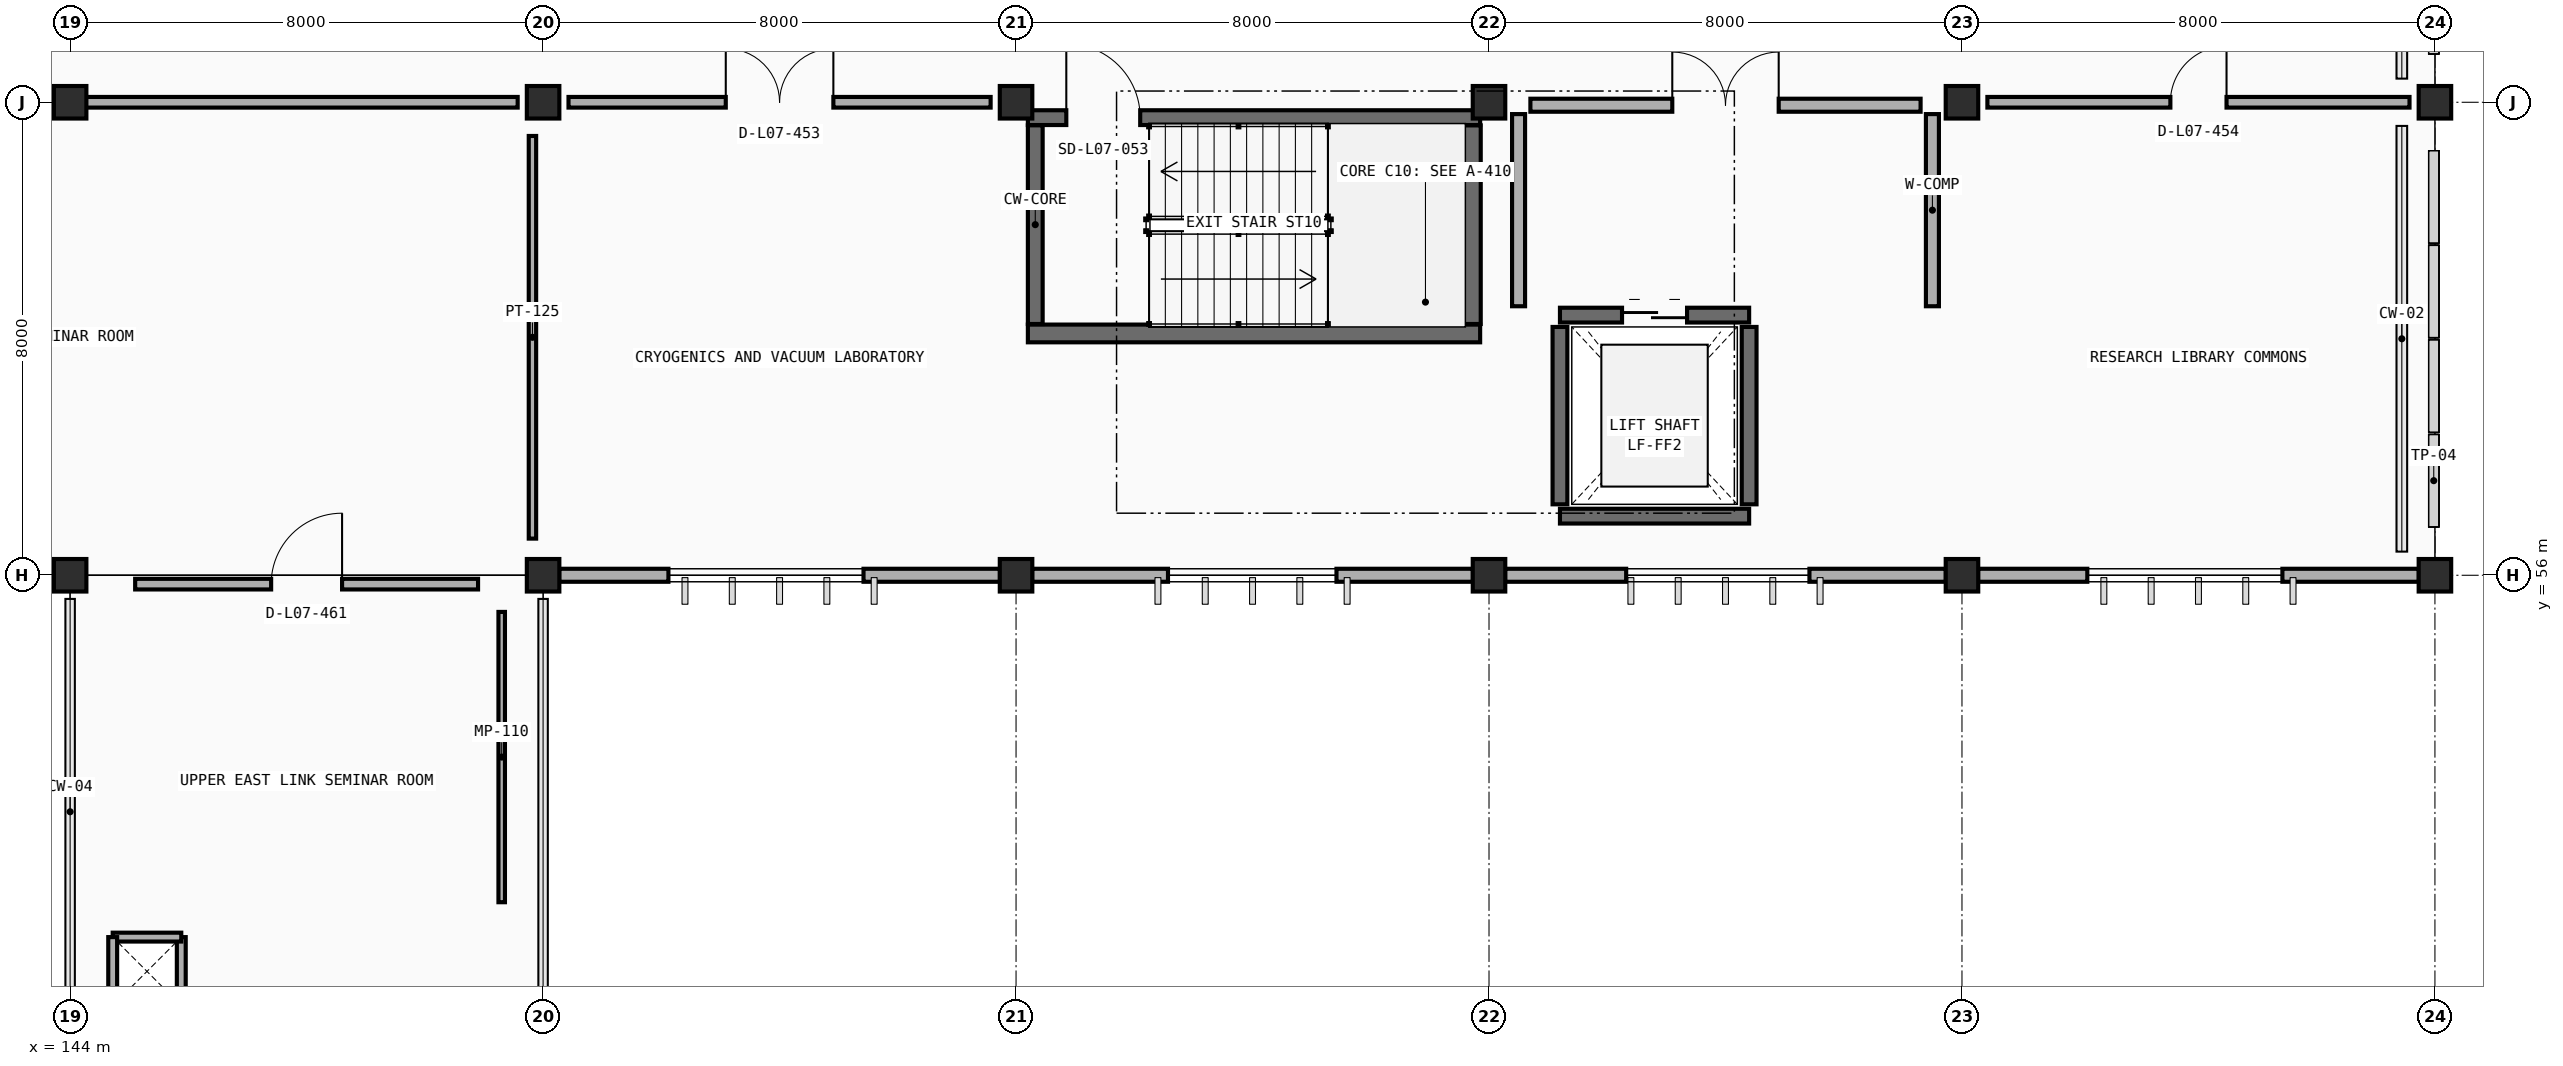
"""IFC4 building model, lengths in metres.
Left out: names, types, materials, properties, quantities, classifications, styles, units other than length and angle.
Written with IfcOpenShell. Run it as: python <this file> out.ifc"""

import sys

from ifc_helpers import new_model, si_unit, direction, frame, frame_2d, origin, origin_2d, place, context, subcontext, project, spatial, rectangle, extrude, element, fill, save


model = new_model("IFC4")
c1 = context("Model", 3, precision=1e-05, world=origin(), true_north=direction((0.0, 1.0)))
c2 = subcontext(c1, "Body", "Model", "MODEL_VIEW")
j1 = project(units=[si_unit("LENGTHUNIT", "METRE"), si_unit("PLANEANGLEUNIT", "RADIAN")], contexts=[c1])
p1 = place(None, origin())
s1 = spatial("IfcSite", under=j1, at=p1, CompositionType="ELEMENT")
p2 = place(p1, origin())
s2 = spatial("IfcBuilding", under=s1, at=p2, CompositionType="ELEMENT")
p3 = place(p2, frame((0.0, 0.0, 26.4)))
s3 = spatial("IfcBuildingStorey", under=s2, at=p3, CompositionType="ELEMENT", Elevation=26.4)
for number, where, z_axis, x_axis in (
    (1, (144.0, 56.0, 0.0), (0.0, 0.0, 1.0), (1.0, 0.0, 0.0)),
    (2, (152.0, 56.0, 0.0), (0.0, 0.0, 1.0), (1.0, 0.0, 0.0)),
    (3, (160.0, 56.0, 0.0), (0.0, 0.0, 1.0), (1.0, 0.0, 0.0)),
    (4, (168.0, 56.0, 0.0), (0.0, 0.0, 1.0), (1.0, 0.0, 0.0)),
    (5, (176.0, 56.0, 0.0), (0.0, 0.0, 1.0), (1.0, 0.0, 0.0)),
    (6, (184.0, 56.0, 0.0), (0.0, 0.0, 1.0), (1.0, 0.0, 0.0)),
    (7, (144.0, 64.0, 0.0), (0.0, 0.0, 1.0), (1.0, 0.0, 0.0)),
    (8, (152.0, 64.0, 0.0), (0.0, 0.0, 1.0), (1.0, 0.0, 0.0)),
    (9, (160.0, 64.0, 0.0), (0.0, 0.0, 1.0), (1.0, 0.0, 0.0)),
    (10, (168.0, 64.0, 0.0), (0.0, 0.0, 1.0), (1.0, 0.0, 0.0)),
    (11, (176.0, 64.0, 0.0), (0.0, 0.0, 1.0), (1.0, 0.0, 0.0)),
    (12, (184.0, 64.0, 0.0), (0.0, 0.0, 1.0), (1.0, 0.0, 0.0)),
):
    element("IfcColumn", number, at=place(p3, frame(where, z_axis=z_axis, x_axis=x_axis)), inside=s3, PredefinedType="COLUMN", context=c2, shape_type="SweptSolid", body=[
        extrude(rectangle(XDim=0.55, YDim=0.55, at=origin_2d()), origin(), (0.0, 0.0, 1.0), 4.2),
    ])
p4 = place(p3, frame((143.728, 56.0, 0.0), z_axis=(0.0, 0.0, 1.0), x_axis=(-1.0, 0.0, 0.0)))
e13 = element("IfcWall", 13, at=p4, inside=s3, PredefinedType="STANDARD", context=c2, shape_type="SweptSolid", body=[
    extrude(rectangle(XDim=7.456, YDim=0.22, at=frame_2d((3.728, 0.0))), origin(), (0.0, 0.0, 1.0), 3.35),
])
p5 = place(p4, frame((2.308, 0.0, 0.9)))
e14 = element("IfcOpeningElement", 14, at=p5, cuts=e13, PredefinedType="OPENING", context=c2, shape_type="SweptSolid", body=[
    extrude(rectangle(XDim=2.85, YDim=2.0, at=frame_2d((1.425, 1.0))), frame((0.0, 0.12, 0.0), z_axis=(0.0, -1.0, 0.0), x_axis=(1.0, 0.0, 0.0)), (0.0, 0.0, 1.0), 0.24),
])
p6 = place(p3, frame((159.728, 56.0, 0.0), z_axis=(0.0, 0.0, 1.0), x_axis=(-1.0, 0.0, 0.0)))
e15 = element("IfcWall", 15, at=p6, inside=s3, PredefinedType="STANDARD", context=c2, shape_type="SweptSolid", body=[
    extrude(rectangle(XDim=7.456, YDim=0.22, at=frame_2d((3.728, 0.0))), origin(), (0.0, 0.0, 1.0), 3.35),
])
p7 = place(p6, frame((2.308, 0.0, 0.9)))
e16 = element("IfcOpeningElement", 16, at=p7, cuts=e15, PredefinedType="OPENING", context=c2, shape_type="SweptSolid", body=[
    extrude(rectangle(XDim=3.3, YDim=1.75, at=frame_2d((1.65, 0.875))), frame((0.0, 0.12, 0.0), z_axis=(0.0, -1.0, 0.0), x_axis=(1.0, 0.0, 0.0)), (0.0, 0.0, 1.0), 0.24),
])
p8 = place(p3, frame((167.728, 56.0, 0.0), z_axis=(0.0, 0.0, 1.0), x_axis=(-1.0, 0.0, 0.0)))
e17 = element("IfcWall", 17, at=p8, inside=s3, PredefinedType="STANDARD", context=c2, shape_type="SweptSolid", body=[
    extrude(rectangle(XDim=7.456, YDim=0.22, at=frame_2d((3.728, 0.0))), origin(), (0.0, 0.0, 1.0), 3.35),
])
p9 = place(p8, frame((2.308, 0.0, 0.9)))
e18 = element("IfcOpeningElement", 18, at=p9, cuts=e17, PredefinedType="OPENING", context=c2, shape_type="SweptSolid", body=[
    extrude(rectangle(XDim=2.85, YDim=2.0, at=frame_2d((1.425, 1.0))), frame((0.0, 0.12, 0.0), z_axis=(0.0, -1.0, 0.0), x_axis=(1.0, 0.0, 0.0)), (0.0, 0.0, 1.0), 0.24),
])
p10 = place(p3, frame((175.728, 56.0, 0.0), z_axis=(0.0, 0.0, 1.0), x_axis=(-1.0, 0.0, 0.0)))
e19 = element("IfcWall", 19, at=p10, inside=s3, PredefinedType="STANDARD", context=c2, shape_type="SweptSolid", body=[
    extrude(rectangle(XDim=7.456, YDim=0.22, at=frame_2d((3.728, 0.0))), origin(), (0.0, 0.0, 1.0), 3.35),
])
p11 = place(p10, frame((2.308, 0.0, 0.9)))
e20 = element("IfcOpeningElement", 20, at=p11, cuts=e19, PredefinedType="OPENING", context=c2, shape_type="SweptSolid", body=[
    extrude(rectangle(XDim=3.1, YDim=1.6, at=frame_2d((1.55, 0.8))), frame((0.0, 0.12, 0.0), z_axis=(0.0, -1.0, 0.0), x_axis=(1.0, 0.0, 0.0)), (0.0, 0.0, 1.0), 0.24),
])
p12 = place(p3, frame((183.728, 56.0, 0.0), z_axis=(0.0, 0.0, 1.0), x_axis=(-1.0, 0.0, 0.0)))
e21 = element("IfcWall", 21, at=p12, inside=s3, PredefinedType="STANDARD", context=c2, shape_type="SweptSolid", body=[
    extrude(rectangle(XDim=7.456, YDim=0.22, at=frame_2d((3.728, 0.0))), origin(), (0.0, 0.0, 1.0), 3.35),
])
p13 = place(p12, frame((2.308, 0.0, 0.9)))
e22 = element("IfcOpeningElement", 22, at=p13, cuts=e21, PredefinedType="OPENING", context=c2, shape_type="SweptSolid", body=[
    extrude(rectangle(XDim=3.3, YDim=1.75, at=frame_2d((1.65, 0.875))), frame((0.0, 0.12, 0.0), z_axis=(0.0, -1.0, 0.0), x_axis=(1.0, 0.0, 0.0)), (0.0, 0.0, 1.0), 0.24),
])
for number, where, z_axis, x_axis in (
    (23, (183.76, 56.22, 0.0), (0.0, 0.0, 1.0), (-1.0, 0.0, 0.0)),
    (24, (183.76, 63.78, 0.0), (0.0, 0.0, 1.0), (-1.0, 0.0, 0.0)),
    (25, (183.76, 64.22, 0.0), (0.0, 0.0, 1.0), (-1.0, 0.0, 0.0)),
):
    element("IfcWall", number, at=place(p3, frame(where, z_axis=z_axis, x_axis=x_axis)), inside=s3, PredefinedType="PARAPET", context=c2, shape_type="SweptSolid", body=[
        extrude(rectangle(XDim=0.32, YDim=0.2, at=frame_2d((0.16, 0.0))), origin(), (0.0, 0.0, 1.0), 3.35),
    ])
p14 = place(p3, frame((160.2, 60.09, 0.0), z_axis=(0.0, 0.0, 1.0), x_axis=(1.0, 0.0, 0.0)))
e26 = element("IfcWall", 26, at=p14, inside=s3, PredefinedType="SHEAR", context=c2, shape_type="SweptSolid", body=[
    extrude(rectangle(XDim=7.65, YDim=0.3, at=frame_2d((3.825, 0.0))), origin(), (0.0, 0.0, 1.0), 4.2),
])
p15 = place(p3, frame((167.71, 60.25, 0.0), z_axis=(0.0, 0.0, 1.0), x_axis=(0.0, 1.0, 0.0)))
e27 = element("IfcWall", 27, at=p15, inside=s3, PredefinedType="SHEAR", context=c2, shape_type="SweptSolid", body=[
    extrude(rectangle(XDim=3.36, YDim=0.3, at=frame_2d((1.68, 0.0))), origin(), (0.0, 0.0, 1.0), 4.2),
])
p16 = place(p3, frame((160.2, 63.74, 0.0), z_axis=(0.0, 0.0, 1.0), x_axis=(1.0, 0.0, 0.0)))
e28 = element("IfcWall", 28, at=p16, inside=s3, PredefinedType="SOLIDWALL", context=c2, shape_type="SweptSolid", body=[
    extrude(rectangle(XDim=7.65, YDim=0.25, at=frame_2d((3.825, 0.0))), origin(), (0.0, 0.0, 1.0), 4.2),
])
p17 = place(p16, frame((0.65, 0.0, 0.0)))
e29 = element("IfcOpeningElement", 29, at=p17, cuts=e28, PredefinedType="OPENING", context=c2, shape_type="SweptSolid", body=[
    extrude(rectangle(XDim=1.25, YDim=2.15, at=frame_2d((0.625, 1.075))), frame((0.0, 0.135, 0.0), z_axis=(0.0, -1.0, 0.0), x_axis=(1.0, 0.0, 0.0)), (0.0, 0.0, 1.0), 0.27),
])
p18 = place(p3, frame((160.325, 60.25, 0.0), z_axis=(0.0, 0.0, 1.0), x_axis=(0.0, 1.0, 0.0)))
e30 = element("IfcWall", 30, at=p18, inside=s3, PredefinedType="SOLIDWALL", context=c2, shape_type="SweptSolid", body=[
    extrude(rectangle(XDim=3.36, YDim=0.25, at=frame_2d((1.68, 0.0))), origin(), (0.0, 0.0, 1.0), 4.2),
])
p19 = place(p3, frame((169.2, 57.0, 0.0), z_axis=(0.0, 0.0, 1.0), x_axis=(1.0, 0.0, 0.0)))
e31 = element("IfcWall", 31, at=p19, inside=s3, PredefinedType="SOLIDWALL", context=c2, shape_type="SweptSolid", body=[
    extrude(rectangle(XDim=3.2, YDim=0.25, at=frame_2d((1.6, 0.0))), origin(), (0.0, 0.0, 1.0), 4.2),
])
p20 = place(p3, frame((169.2, 60.4, 0.0), z_axis=(0.0, 0.0, 1.0), x_axis=(1.0, 0.0, 0.0)))
e32 = element("IfcWall", 32, at=p20, inside=s3, PredefinedType="SOLIDWALL", context=c2, shape_type="SweptSolid", body=[
    extrude(rectangle(XDim=3.2, YDim=0.25, at=frame_2d((1.6, 0.0))), origin(), (0.0, 0.0, 1.0), 4.2),
])
p21 = place(p20, frame((1.05, 0.0, 0.0)))
e33 = element("IfcOpeningElement", 33, at=p21, cuts=e32, PredefinedType="OPENING", context=c2, shape_type="SweptSolid", body=[
    extrude(rectangle(XDim=1.1, YDim=2.15, at=frame_2d((0.55, 1.075))), frame((0.0, 0.135, 0.0), z_axis=(0.0, -1.0, 0.0), x_axis=(1.0, 0.0, 0.0)), (0.0, 0.0, 1.0), 0.27),
])
for number, where, z_axis, x_axis in (
    (34, (169.2, 57.2, 0.0), (0.0, 0.0, 1.0), (0.0, 1.0, 0.0)),
    (35, (172.4, 57.2, 0.0), (0.0, 0.0, 1.0), (0.0, 1.0, 0.0)),
):
    element("IfcWall", number, at=place(p3, frame(where, z_axis=z_axis, x_axis=x_axis)), inside=s3, PredefinedType="SOLIDWALL", context=c2, shape_type="SweptSolid", body=[
        extrude(rectangle(XDim=3.0, YDim=0.25, at=frame_2d((1.5, 0.0))), origin(), (0.0, 0.0, 1.0), 4.2),
    ])
p22 = place(p3, frame((168.7, 63.95, 0.0), z_axis=(0.0, 0.0, 1.0), x_axis=(1.0, 0.0, 0.0)))
e36 = element("IfcWall", 36, at=p22, inside=s3, PredefinedType="PARTITIONING", context=c2, shape_type="SweptSolid", body=[
    extrude(rectangle(XDim=6.6, YDim=0.22, at=frame_2d((3.3, 0.0))), origin(), (0.0, 0.0, 1.0), 3.3),
])
p23 = place(p22, frame((2.4, 0.0, 0.0)))
e37 = element("IfcOpeningElement", 37, at=p23, cuts=e36, PredefinedType="OPENING", context=c2, shape_type="SweptSolid", body=[
    extrude(rectangle(XDim=1.8, YDim=2.2, at=frame_2d((0.9, 1.1))), frame((0.0, 0.12, 0.0), z_axis=(0.0, -1.0, 0.0), x_axis=(1.0, 0.0, 0.0)), (0.0, 0.0, 1.0), 0.24),
])
for number, where, z_axis, x_axis in (
    (38, (168.5, 60.55, 0.0), (0.0, 0.0, 1.0), (0.0, 1.0, 0.0)),
    (39, (175.5, 60.55, 0.0), (0.0, 0.0, 1.0), (0.0, 1.0, 0.0)),
):
    element("IfcWall", number, at=place(p3, frame(where, z_axis=z_axis, x_axis=x_axis)), inside=s3, PredefinedType="PARTITIONING", context=c2, shape_type="SweptSolid", body=[
        extrude(rectangle(XDim=3.25, YDim=0.22, at=frame_2d((1.625, 0.0))), origin(), (0.0, 0.0, 1.0), 3.3),
    ])
for number, where, z_axis, x_axis in (
    (40, (145.88, 48.72, 0.0), (0.0, 0.0, 1.0), (0.0, 1.0, 0.0)),
    (41, (145.88, 49.88, 0.0), (0.0, 0.0, 1.0), (-1.0, 0.0, 0.0)),
    (42, (144.72, 49.88, 0.0), (0.0, 0.0, 1.0), (0.0, -1.0, 0.0)),
):
    element("IfcWall", number, at=place(p3, frame(where, z_axis=z_axis, x_axis=x_axis)), inside=s3, PredefinedType="PARTITIONING", context=c2, shape_type="SweptSolid", body=[
        extrude(rectangle(XDim=1.16, YDim=0.15, at=frame_2d((0.58, 0.0))), origin(), (0.0, 0.0, 1.0), 3.9),
    ])
p24 = place(p3, frame((136.43, 64.0, 0.0), z_axis=(0.0, 0.0, 1.0), x_axis=(1.0, 0.0, 0.0)))
e43 = element("IfcWall", 43, at=p24, inside=s3, PredefinedType="PARTITIONING", context=c2, shape_type="SweptSolid", body=[
    extrude(rectangle(XDim=15.14, YDim=0.18, at=frame_2d((7.57, 0.0))), origin(), (0.0, 0.0, 1.0), 3.3),
])
p25 = place(p24, frame((2.61, 0.0, 0.0)))
e44 = element("IfcOpeningElement", 44, at=p25, cuts=e43, PredefinedType="OPENING", context=c2, shape_type="SweptSolid", body=[
    extrude(rectangle(XDim=1.92, YDim=2.3, at=frame_2d((0.96, 1.15))), frame((0.0, 0.1, 0.0), z_axis=(0.0, -1.0, 0.0), x_axis=(1.0, 0.0, 0.0)), (0.0, 0.0, 1.0), 0.2),
])
p26 = place(p3, frame((151.82, 56.62, 0.0), z_axis=(0.0, 0.0, 1.0), x_axis=(0.0, 1.0, 0.0)))
e45 = element("IfcWall", 45, at=p26, inside=s3, PredefinedType="PARTITIONING", context=c2, shape_type="SweptSolid", body=[
    extrude(rectangle(XDim=6.81, YDim=0.125, at=frame_2d((3.405, 0.0))), origin(), (0.0, 0.0, 1.0), 3.3),
])
p27 = place(p3, frame((152.43, 64.0, 0.0), z_axis=(0.0, 0.0, 1.0), x_axis=(1.0, 0.0, 0.0)))
e46 = element("IfcWall", 46, at=p27, inside=s3, PredefinedType="PARTITIONING", context=c2, shape_type="SweptSolid", body=[
    extrude(rectangle(XDim=7.14, YDim=0.18, at=frame_2d((3.57, 0.0))), origin(), (0.0, 0.0, 1.0), 3.3),
])
p28 = place(p27, frame((2.66, 0.0, 0.0)))
e47 = element("IfcOpeningElement", 47, at=p28, cuts=e46, PredefinedType="OPENING", context=c2, shape_type="SweptSolid", body=[
    extrude(rectangle(XDim=1.82, YDim=2.25, at=frame_2d((0.91, 1.125))), frame((0.0, 0.1, 0.0), z_axis=(0.0, -1.0, 0.0), x_axis=(1.0, 0.0, 0.0)), (0.0, 0.0, 1.0), 0.2),
])
p29 = place(p3, frame((176.43, 64.0, 0.0), z_axis=(0.0, 0.0, 1.0), x_axis=(1.0, 0.0, 0.0)))
e48 = element("IfcWall", 48, at=p29, inside=s3, PredefinedType="PARTITIONING", context=c2, shape_type="SweptSolid", body=[
    extrude(rectangle(XDim=7.14, YDim=0.18, at=frame_2d((3.57, 0.0))), origin(), (0.0, 0.0, 1.0), 3.3),
])
p30 = place(p29, frame((3.095, 0.0, 0.0)))
e49 = element("IfcOpeningElement", 49, at=p30, cuts=e48, PredefinedType="OPENING", context=c2, shape_type="SweptSolid", body=[
    extrude(rectangle(XDim=0.95, YDim=2.1, at=frame_2d((0.475, 1.05))), frame((0.0, 0.1, 0.0), z_axis=(0.0, -1.0, 0.0), x_axis=(1.0, 0.0, 0.0)), (0.0, 0.0, 1.0), 0.2),
])
p31 = place(p3, frame((145.1, 55.85, 0.0), z_axis=(0.0, 0.0, 1.0), x_axis=(1.0, 0.0, 0.0)))
e50 = element("IfcWall", 50, at=p31, inside=s3, PredefinedType="PARTITIONING", context=c2, shape_type="SweptSolid", body=[
    extrude(rectangle(XDim=5.8, YDim=0.18, at=frame_2d((2.9, 0.0))), origin(), (0.0, 0.0, 1.0), 3.3),
])
p32 = place(p31, frame((2.3, 0.0, 0.0)))
e51 = element("IfcOpeningElement", 51, at=p32, cuts=e50, PredefinedType="OPENING", context=c2, shape_type="SweptSolid", body=[
    extrude(rectangle(XDim=1.2, YDim=2.2, at=frame_2d((0.6, 1.1))), frame((0.0, 0.1, 0.0), z_axis=(0.0, -1.0, 0.0), x_axis=(1.0, 0.0, 0.0)), (0.0, 0.0, 1.0), 0.2),
])
p33 = place(p3, frame((151.3, 50.47, 0.0), z_axis=(0.0, 0.0, 1.0), x_axis=(0.0, 1.0, 0.0)))
e52 = element("IfcWall", 52, at=p33, inside=s3, PredefinedType="MOVABLE", context=c2, shape_type="SweptSolid", body=[
    extrude(rectangle(XDim=4.91, YDim=0.11, at=frame_2d((2.455, 0.0))), origin(), (0.0, 0.0, 1.0), 3.3),
])
p34 = place(p7, origin())
e53 = element("IfcWindow", 53, at=p34, inside=s3, PartitioningType="DOUBLE_PANEL_VERTICAL", PredefinedType="WINDOW", context=c2, shape_type="SweptSolid", body=[
    extrude(rectangle(XDim=3.3, YDim=1.75, at=frame_2d((1.65, 0.875))), frame((0.0, 0.03, 0.0), z_axis=(0.0, -1.0, 0.0), x_axis=(1.0, 0.0, 0.0)), (0.0, 0.0, 1.0), 0.06),
])
fill(e16, e53)
p35 = place(p9, origin())
e54 = element("IfcWindow", 54, at=p35, inside=s3, PartitioningType="DOUBLE_PANEL_VERTICAL", PredefinedType="WINDOW", context=c2, shape_type="SweptSolid", body=[
    extrude(rectangle(XDim=2.85, YDim=2.0, at=frame_2d((1.425, 1.0))), frame((0.0, 0.03, 0.0), z_axis=(0.0, -1.0, 0.0), x_axis=(1.0, 0.0, 0.0)), (0.0, 0.0, 1.0), 0.06),
])
fill(e18, e54)
p36 = place(p11, origin())
e55 = element("IfcWindow", 55, at=p36, inside=s3, PartitioningType="DOUBLE_PANEL_VERTICAL", PredefinedType="WINDOW", context=c2, shape_type="SweptSolid", body=[
    extrude(rectangle(XDim=3.1, YDim=1.6, at=frame_2d((1.55, 0.8))), frame((0.0, 0.03, 0.0), z_axis=(0.0, -1.0, 0.0), x_axis=(1.0, 0.0, 0.0)), (0.0, 0.0, 1.0), 0.06),
])
fill(e20, e55)
p37 = place(p13, origin())
e56 = element("IfcWindow", 56, at=p37, inside=s3, PartitioningType="DOUBLE_PANEL_VERTICAL", PredefinedType="WINDOW", context=c2, shape_type="SweptSolid", body=[
    extrude(rectangle(XDim=3.3, YDim=1.75, at=frame_2d((1.65, 0.875))), frame((0.0, 0.03, 0.0), z_axis=(0.0, -1.0, 0.0), x_axis=(1.0, 0.0, 0.0)), (0.0, 0.0, 1.0), 0.06),
])
fill(e22, e56)
p38 = place(p17, origin())
e57 = element("IfcDoor", 57, at=p38, inside=s3, OperationType="SINGLE_SWING_LEFT", PredefinedType="DOOR", context=c2, shape_type="SweptSolid", body=[
    extrude(rectangle(XDim=1.25, YDim=2.15, at=frame_2d((0.625, 1.075))), frame((0.0, 0.025, 0.0), z_axis=(0.0, -1.0, 0.0), x_axis=(1.0, 0.0, 0.0)), (0.0, 0.0, 1.0), 0.05),
])
fill(e29, e57)
p39 = place(p21, origin())
e58 = element("IfcDoor", 58, at=p39, inside=s3, OperationType="DOUBLE_DOOR_SLIDING", PredefinedType="DOOR", context=c2, shape_type="SweptSolid", body=[
    extrude(rectangle(XDim=1.1, YDim=2.15, at=frame_2d((0.55, 1.075))), frame((0.0, 0.025, 0.0), z_axis=(0.0, -1.0, 0.0), x_axis=(1.0, 0.0, 0.0)), (0.0, 0.0, 1.0), 0.05),
])
fill(e33, e58)
p40 = place(p23, origin())
e59 = element("IfcDoor", 59, at=p40, inside=s3, OperationType="DOUBLE_DOOR_SINGLE_SWING", PredefinedType="DOOR", context=c2, shape_type="SweptSolid", body=[
    extrude(rectangle(XDim=1.8, YDim=2.2, at=frame_2d((0.9, 1.1))), frame((0.0, 0.025, 0.0), z_axis=(0.0, -1.0, 0.0), x_axis=(1.0, 0.0, 0.0)), (0.0, 0.0, 1.0), 0.05),
])
fill(e37, e59)
p41 = place(p28, origin())
e60 = element("IfcDoor", 60, at=p41, inside=s3, OperationType="DOUBLE_DOOR_SINGLE_SWING", PredefinedType="DOOR", context=c2, shape_type="SweptSolid", body=[
    extrude(rectangle(XDim=1.82, YDim=2.25, at=frame_2d((0.91, 1.125))), frame((0.0, 0.025, 0.0), z_axis=(0.0, -1.0, 0.0), x_axis=(1.0, 0.0, 0.0)), (0.0, 0.0, 1.0), 0.05),
])
fill(e47, e60)
p42 = place(p30, origin())
e61 = element("IfcDoor", 61, at=p42, inside=s3, OperationType="SINGLE_SWING_RIGHT", PredefinedType="DOOR", context=c2, shape_type="SweptSolid", body=[
    extrude(rectangle(XDim=0.95, YDim=2.1, at=frame_2d((0.475, 1.05))), frame((0.0, 0.025, 0.0), z_axis=(0.0, -1.0, 0.0), x_axis=(1.0, 0.0, 0.0)), (0.0, 0.0, 1.0), 0.05),
])
fill(e49, e61)
p43 = place(p32, origin())
e62 = element("IfcDoor", 62, at=p43, inside=s3, OperationType="SINGLE_SWING_RIGHT", PredefinedType="DOOR", context=c2, shape_type="SweptSolid", body=[
    extrude(rectangle(XDim=1.2, YDim=2.2, at=frame_2d((0.6, 1.1))), frame((0.0, 0.025, 0.0), z_axis=(0.0, -1.0, 0.0), x_axis=(1.0, 0.0, 0.0)), (0.0, 0.0, 1.0), 0.05),
])
fill(e51, e62)
save(model, sys.argv[1])
